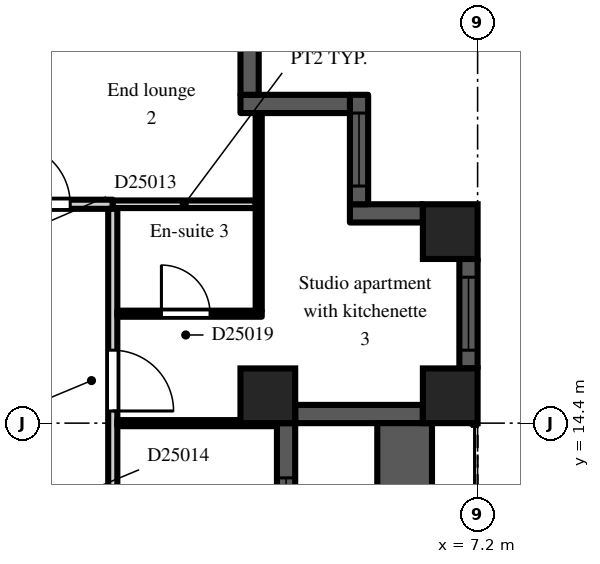
"""IFC4 building model, lengths in metres.
Left out: names, types, materials, properties, quantities, classifications, styles, units other than length and angle.
Written with IfcOpenShell. Run it as: python <this file> out.ifc"""

import sys

from ifc_helpers import new_model, si_unit, direction, frame, frame_2d, origin, origin_2d, place, context, subcontext, project, spatial, rectangle, extrude, element, fill, save


model = new_model("IFC4")
c1 = context("Model", 3, precision=1e-05, world=origin(), true_north=direction((0.0, 1.0)))
c2 = subcontext(c1, "Body", "Model", "MODEL_VIEW")
j1 = project(units=[si_unit("LENGTHUNIT", "METRE"), si_unit("PLANEANGLEUNIT", "RADIAN")], contexts=[c1])
p1 = place(None, origin())
s1 = spatial("IfcSite", under=j1, at=p1, CompositionType="ELEMENT")
p2 = place(p1, origin())
s2 = spatial("IfcBuilding", under=s1, at=p2, CompositionType="ELEMENT")
p3 = place(p2, frame((0.0, 0.0, 170.7)))
s3 = spatial("IfcBuildingStorey", under=s2, at=p3, CompositionType="ELEMENT", Elevation=170.7)
for number, where, z_axis, x_axis in (
    (1, (3.75, 14.85, 0.0), (0.0, 0.0, 1.0), (1.0, 0.0, 0.0)),
    (2, (6.75, 14.85, 0.0), (0.0, 0.0, 1.0), (1.0, 0.0, 0.0)),
    (3, (6.75, 17.55, 0.0), (0.0, 0.0, 1.0), (1.0, 0.0, 0.0)),
):
    element("IfcColumn", number, at=place(p3, frame(where, z_axis=z_axis, x_axis=x_axis)), inside=s3, PredefinedType="COLUMN", context=c2, shape_type="SweptSolid", body=[
        extrude(rectangle(XDim=0.9, YDim=0.9, at=origin_2d()), origin(), (0.0, 0.0, 1.0), 3.0),
    ])
p4 = place(p3, frame((4.05, 7.2, 0.0), z_axis=(0.0, 0.0, 1.0), x_axis=(0.0, 1.0, 0.0)))
e4 = element("IfcWall", 4, at=p4, inside=s3, PredefinedType="SOLIDWALL", context=c2, shape_type="SweptSolid", body=[
    extrude(rectangle(XDim=7.2, YDim=0.3, at=frame_2d((3.6, 0.0))), origin(), (0.0, 0.0, 1.0), 2.2),
])
p5 = place(p4, frame((3.0, 0.0, 0.0)))
e5 = element("IfcOpeningElement", 5, at=p5, cuts=e4, PredefinedType="OPENING", context=c2, shape_type="SweptSolid", body=[
    extrude(rectangle(XDim=1.2, YDim=2.05, at=frame_2d((0.6, 1.025))), frame((0.0, 0.16, 0.0), z_axis=(0.0, -1.0, 0.0), x_axis=(1.0, 0.0, 0.0)), (0.0, 0.0, 1.0), 0.32),
])
p6 = place(p4, frame((0.9, 0.0, 0.2)))
e6 = element("IfcOpeningElement", 6, at=p6, cuts=e4, PredefinedType="OPENING", context=c2, shape_type="SweptSolid", body=[
    extrude(rectangle(XDim=1.8, YDim=1.85, at=frame_2d((0.9, 0.925))), frame((0.0, 0.16, 0.0), z_axis=(0.0, -1.0, 0.0), x_axis=(1.0, 0.0, 0.0)), (0.0, 0.0, 1.0), 0.32),
])
p7 = place(p4, frame((4.5, 0.0, 0.2)))
e7 = element("IfcOpeningElement", 7, at=p7, cuts=e4, PredefinedType="OPENING", context=c2, shape_type="SweptSolid", body=[
    extrude(rectangle(XDim=1.8, YDim=1.85, at=frame_2d((0.9, 0.925))), frame((0.0, 0.16, 0.0), z_axis=(0.0, -1.0, 0.0), x_axis=(1.0, 0.0, 0.0)), (0.0, 0.0, 1.0), 0.32),
])
p8 = place(p3, frame((4.2, 14.55, 0.0), z_axis=(0.0, 0.0, 1.0), x_axis=(1.0, 0.0, 0.0)))
e8 = element("IfcWall", 8, at=p8, inside=s3, PredefinedType="SOLIDWALL", context=c2, shape_type="SweptSolid", body=[
    extrude(rectangle(XDim=2.1, YDim=0.3, at=frame_2d((1.05, 0.0))), origin(), (0.0, 0.0, 1.0), 2.2),
])
p9 = place(p3, frame((7.05, 15.3, 0.0), z_axis=(0.0, 0.0, 1.0), x_axis=(0.0, 1.0, 0.0)))
e9 = element("IfcWall", 9, at=p9, inside=s3, PredefinedType="SOLIDWALL", context=c2, shape_type="SweptSolid", body=[
    extrude(rectangle(XDim=1.8, YDim=0.3, at=frame_2d((0.9, 0.0))), origin(), (0.0, 0.0, 1.0), 2.2),
])
p10 = place(p9, frame((0.3, 0.0, 0.2)))
e10 = element("IfcOpeningElement", 10, at=p10, cuts=e9, PredefinedType="OPENING", context=c2, shape_type="SweptSolid", body=[
    extrude(rectangle(XDim=1.2, YDim=1.85, at=frame_2d((0.6, 0.925))), frame((0.0, 0.16, 0.0), z_axis=(0.0, -1.0, 0.0), x_axis=(1.0, 0.0, 0.0)), (0.0, 0.0, 1.0), 0.32),
])
p11 = place(p3, frame((6.3, 17.85, 0.0), z_axis=(0.0, 0.0, 1.0), x_axis=(-1.0, 0.0, 0.0)))
e11 = element("IfcWall", 11, at=p11, inside=s3, PredefinedType="SOLIDWALL", context=c2, shape_type="SweptSolid", body=[
    extrude(rectangle(XDim=1.2, YDim=0.3, at=frame_2d((0.6, 0.0))), origin(), (0.0, 0.0, 1.0), 2.6),
])
p12 = place(p3, frame((5.25, 18.0, 0.0), z_axis=(0.0, 0.0, 1.0), x_axis=(0.0, 1.0, 0.0)))
e12 = element("IfcWall", 12, at=p12, inside=s3, PredefinedType="SOLIDWALL", context=c2, shape_type="SweptSolid", body=[
    extrude(rectangle(XDim=1.8, YDim=0.3, at=frame_2d((0.9, 0.0))), origin(), (0.0, 0.0, 1.0), 2.6),
])
p13 = place(p12, frame((0.3, 0.0, 0.2)))
e13 = element("IfcOpeningElement", 13, at=p13, cuts=e12, PredefinedType="OPENING", context=c2, shape_type="SweptSolid", body=[
    extrude(rectangle(XDim=1.2, YDim=1.85, at=frame_2d((0.6, 0.925))), frame((0.0, 0.16, 0.0), z_axis=(0.0, -1.0, 0.0), x_axis=(1.0, 0.0, 0.0)), (0.0, 0.0, 1.0), 0.32),
])
p14 = place(p3, frame((5.1, 19.65, 0.0), z_axis=(0.0, 0.0, 1.0), x_axis=(-1.0, 0.0, 0.0)))
e14 = element("IfcWall", 14, at=p14, inside=s3, PredefinedType="SOLIDWALL", context=c2, shape_type="SweptSolid", body=[
    extrude(rectangle(XDim=1.8, YDim=0.3, at=frame_2d((0.9, 0.0))), origin(), (0.0, 0.0, 1.0), 2.6),
])
p15 = place(p3, frame((3.45, 19.8, 0.0), z_axis=(0.0, 0.0, 1.0), x_axis=(0.0, 1.0, 0.0)))
e15 = element("IfcWall", 15, at=p15, inside=s3, PredefinedType="SOLIDWALL", context=c2, shape_type="SweptSolid", body=[
    extrude(rectangle(XDim=0.9, YDim=0.3, at=frame_2d((0.45, 0.0))), origin(), (0.0, 0.0, 1.0), 2.6),
])
p16 = place(p3, frame((6.0, 7.2, 0.0), z_axis=(0.0, 0.0, 1.0), x_axis=(0.0, 1.0, 0.0)))
e16 = element("IfcWall", 16, at=p16, inside=s3, PredefinedType="PARAPET", context=c2, shape_type="SweptSolid", body=[
    extrude(rectangle(XDim=7.2, YDim=0.9, at=frame_2d((3.6, 0.0))), origin(), (0.0, 0.0, 1.0), 0.8),
])
p17 = place(p3, frame((-1.2, 18.0, 0.0), z_axis=(0.0, 0.0, 1.0), x_axis=(1.0, 0.0, 0.0)))
e17 = element("IfcWall", 17, at=p17, inside=s3, PredefinedType="PARTITIONING", context=c2, shape_type="SweptSolid", body=[
    extrude(rectangle(XDim=2.4, YDim=0.15, at=frame_2d((1.2, 0.0))), origin(), (0.0, 0.0, 1.0), 2.6),
])
p18 = place(p17, frame((0.7, 0.0, 0.0)))
e18 = element("IfcOpeningElement", 18, at=p18, cuts=e17, PredefinedType="OPENING", context=c2, shape_type="SweptSolid", body=[
    extrude(rectangle(XDim=1.0, YDim=2.1, at=frame_2d((0.5, 1.05))), frame((0.0, 0.085, 0.0), z_axis=(0.0, -1.0, 0.0), x_axis=(1.0, 0.0, 0.0)), (0.0, 0.0, 1.0), 0.17),
])
p19 = place(p3, frame((1.2, 1.125, 0.0), z_axis=(0.0, 0.0, 1.0), x_axis=(0.0, 1.0, 0.0)))
e19 = element("IfcWall", 19, at=p19, inside=s3, PredefinedType="PARTITIONING", context=c2, shape_type="SweptSolid", body=[
    extrude(rectangle(XDim=16.8, YDim=0.15, at=frame_2d((8.4, 0.0))), origin(), (0.0, 0.0, 1.0), 2.6),
])
p20 = place(p19, frame((7.025, 0.0, 0.0)))
e20 = element("IfcOpeningElement", 20, at=p20, cuts=e19, PredefinedType="OPENING", context=c2, shape_type="SweptSolid", body=[
    extrude(rectangle(XDim=0.9, YDim=2.1, at=frame_2d((0.45, 1.05))), frame((0.0, 0.085, 0.0), z_axis=(0.0, -1.0, 0.0), x_axis=(1.0, 0.0, 0.0)), (0.0, 0.0, 1.0), 0.17),
])
p21 = place(p19, frame((10.625, 0.0, 0.0)))
e21 = element("IfcOpeningElement", 21, at=p21, cuts=e19, PredefinedType="OPENING", context=c2, shape_type="SweptSolid", body=[
    extrude(rectangle(XDim=0.9, YDim=2.1, at=frame_2d((0.45, 1.05))), frame((0.0, 0.085, 0.0), z_axis=(0.0, -1.0, 0.0), x_axis=(1.0, 0.0, 0.0)), (0.0, 0.0, 1.0), 0.17),
])
p22 = place(p19, frame((13.475, 0.0, 0.0)))
e22 = element("IfcOpeningElement", 22, at=p22, cuts=e19, PredefinedType="OPENING", context=c2, shape_type="SweptSolid", body=[
    extrude(rectangle(XDim=1.0, YDim=2.1, at=frame_2d((0.5, 1.05))), frame((0.0, 0.085, 0.0), z_axis=(0.0, -1.0, 0.0), x_axis=(1.0, 0.0, 0.0)), (0.0, 0.0, 1.0), 0.17),
])
p23 = place(p3, frame((1.275, 14.4, 0.0), z_axis=(0.0, 0.0, 1.0), x_axis=(1.0, 0.0, 0.0)))
e23 = element("IfcWall", 23, at=p23, inside=s3, PredefinedType="PARTITIONING", context=c2, shape_type="SweptSolid", body=[
    extrude(rectangle(XDim=2.625, YDim=0.1, at=frame_2d((1.312, 0.0))), origin(), (0.0, 0.0, 1.0), 2.6),
])
p24 = place(p3, frame((1.275, 16.2, 0.0), z_axis=(0.0, 0.0, 1.0), x_axis=(1.0, 0.0, 0.0)))
e24 = element("IfcWall", 24, at=p24, inside=s3, PredefinedType="PARTITIONING", context=c2, shape_type="SweptSolid", body=[
    extrude(rectangle(XDim=2.375, YDim=0.1, at=frame_2d((1.188, 0.0))), origin(), (0.0, 0.0, 1.0), 2.6),
])
p25 = place(p24, frame((0.725, 0.0, 0.0)))
e25 = element("IfcOpeningElement", 25, at=p25, cuts=e24, PredefinedType="OPENING", context=c2, shape_type="SweptSolid", body=[
    extrude(rectangle(XDim=0.8, YDim=2.1, at=frame_2d((0.4, 1.05))), frame((0.0, 0.06, 0.0), z_axis=(0.0, -1.0, 0.0), x_axis=(1.0, 0.0, 0.0)), (0.0, 0.0, 1.0), 0.12),
])
p26 = place(p3, frame((1.2, 18.0, 0.0), z_axis=(0.0, 0.0, 1.0), x_axis=(1.0, 0.0, 0.0)))
e26 = element("IfcWall", 26, at=p26, inside=s3, PredefinedType="PARTITIONING", context=c2, shape_type="SweptSolid", body=[
    extrude(rectangle(XDim=2.35, YDim=0.125, at=frame_2d((1.175, 0.0))), origin(), (0.0, 0.0, 1.0), 2.6),
])
p27 = place(p3, frame((3.6, 16.25, 0.0), z_axis=(0.0, 0.0, 1.0), x_axis=(0.0, 1.0, 0.0)))
e27 = element("IfcWall", 27, at=p27, inside=s3, PredefinedType="PARTITIONING", context=c2, shape_type="SweptSolid", body=[
    extrude(rectangle(XDim=3.25, YDim=0.1, at=frame_2d((1.625, 0.0))), origin(), (0.0, 0.0, 1.0), 2.6),
])
p28 = place(p7, origin())
e28 = element("IfcWindow", 28, at=p28, inside=s3, PartitioningType="SINGLE_PANEL", PredefinedType="WINDOW", context=c2, shape_type="SweptSolid", body=[
    extrude(rectangle(XDim=1.8, YDim=1.85, at=frame_2d((0.9, 0.925))), frame((0.0, 0.03, 0.0), z_axis=(0.0, -1.0, 0.0), x_axis=(1.0, 0.0, 0.0)), (0.0, 0.0, 1.0), 0.06),
])
fill(e7, e28)
p29 = place(p10, origin())
e29 = element("IfcWindow", 29, at=p29, inside=s3, PartitioningType="SINGLE_PANEL", PredefinedType="WINDOW", context=c2, shape_type="SweptSolid", body=[
    extrude(rectangle(XDim=1.2, YDim=1.85, at=frame_2d((0.6, 0.925))), frame((0.0, 0.03, 0.0), z_axis=(0.0, -1.0, 0.0), x_axis=(1.0, 0.0, 0.0)), (0.0, 0.0, 1.0), 0.06),
])
fill(e10, e29)
p30 = place(p13, origin())
e30 = element("IfcWindow", 30, at=p30, inside=s3, PartitioningType="SINGLE_PANEL", PredefinedType="WINDOW", context=c2, shape_type="SweptSolid", body=[
    extrude(rectangle(XDim=1.2, YDim=1.85, at=frame_2d((0.6, 0.925))), frame((0.0, 0.03, 0.0), z_axis=(0.0, -1.0, 0.0), x_axis=(1.0, 0.0, 0.0)), (0.0, 0.0, 1.0), 0.06),
])
fill(e13, e30)
p31 = place(p18, origin())
e31 = element("IfcDoor", 31, at=p31, inside=s3, OperationType="SINGLE_SWING_LEFT", PredefinedType="DOOR", context=c2, shape_type="SweptSolid", body=[
    extrude(rectangle(XDim=1.0, YDim=2.1, at=frame_2d((0.5, 1.05))), frame((0.0, 0.025, 0.0), z_axis=(0.0, -1.0, 0.0), x_axis=(1.0, 0.0, 0.0)), (0.0, 0.0, 1.0), 0.05),
])
fill(e18, e31)
p32 = place(p25, origin())
e32 = element("IfcDoor", 32, at=p32, inside=s3, OperationType="SINGLE_SWING_LEFT", PredefinedType="DOOR", context=c2, shape_type="SweptSolid", body=[
    extrude(rectangle(XDim=0.8, YDim=2.1, at=frame_2d((0.4, 1.05))), frame((0.0, 0.025, 0.0), z_axis=(0.0, -1.0, 0.0), x_axis=(1.0, 0.0, 0.0)), (0.0, 0.0, 1.0), 0.05),
])
fill(e25, e32)
p33 = place(p22, frame((1.0, 0.0, 0.0), z_axis=(0.0, 0.0, 1.0), x_axis=(-1.0, 0.0, 0.0)))
e33 = element("IfcDoor", 33, at=p33, inside=s3, OperationType="SINGLE_SWING_RIGHT", PredefinedType="DOOR", context=c2, shape_type="SweptSolid", body=[
    extrude(rectangle(XDim=1.0, YDim=2.1, at=frame_2d((0.5, 1.05))), frame((0.0, 0.025, 0.0), z_axis=(0.0, -1.0, 0.0), x_axis=(1.0, 0.0, 0.0)), (0.0, 0.0, 1.0), 0.05),
])
fill(e22, e33)
save(model, sys.argv[1])
